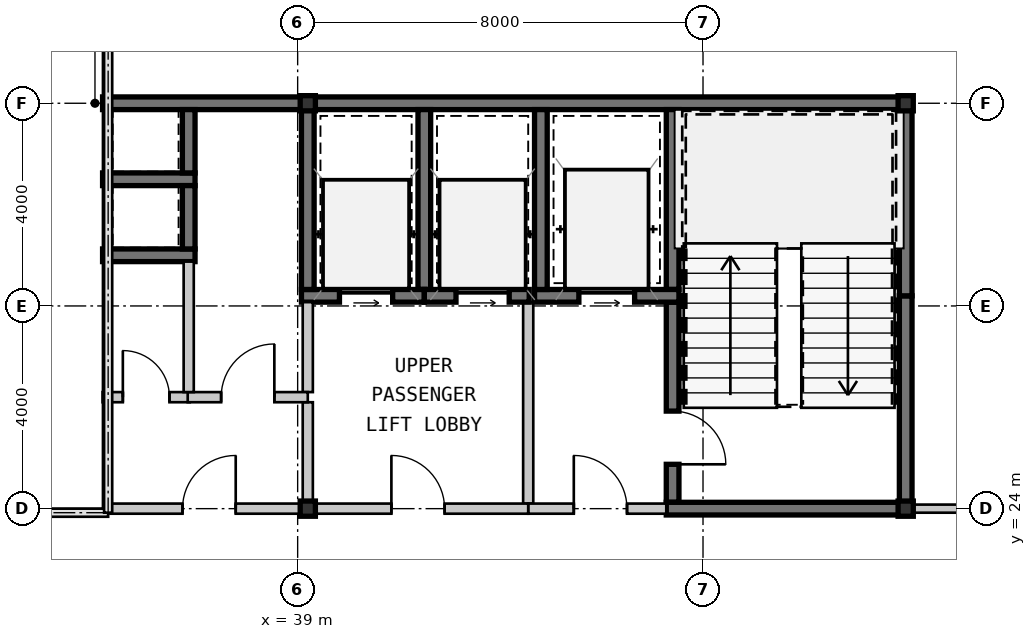
"""IFC4 building model, lengths in metres.
Left out: names, types, materials, properties, quantities, classifications, styles, units other than length and angle.
Written with IfcOpenShell. Run it as: python <this file> out.ifc"""

import sys

from ifc_helpers import new_model, si_unit, direction, frame, frame_2d, origin, origin_2d, place, context, subcontext, project, spatial, rectangle, hollow_rectangle, extrude, source, transform, mapped, element, fill, save


model = new_model("IFC4")
c1 = context("Model", 3, precision=1e-05, world=origin(), true_north=direction((0.0, 1.0)))
c2 = subcontext(c1, "Body", "Model", "MODEL_VIEW")
j1 = project(units=[si_unit("LENGTHUNIT", "METRE"), si_unit("PLANEANGLEUNIT", "RADIAN")], contexts=[c1])
p1 = place(None, origin())
s1 = spatial("IfcSite", under=j1, at=p1, CompositionType="ELEMENT")
p2 = place(p1, origin())
s2 = spatial("IfcBuilding", under=s1, at=p2, CompositionType="ELEMENT")
p3 = place(p2, frame((0.0, 0.0, 233.45)))
s3 = spatial("IfcBuildingStorey", under=s2, at=p3, CompositionType="ELEMENT", Elevation=233.45)
m1 = source(origin(), c2, "Body", "SweptSolid", [
    extrude(hollow_rectangle(XDim=0.3, YDim=0.3, WallThickness=0.012, at=origin_2d()), origin(), (0.0, 0.0, 1.0), 3.15),
])
for number, where, z_axis, x_axis in (
    (1, (39.2, 24.0, 0.0), (0.0, 0.0, 1.0), (1.0, 0.0, 0.0)),
    (2, (51.0, 24.0, 0.0), (0.0, 0.0, 1.0), (1.0, 0.0, 0.0)),
    (3, (39.2, 32.0, 0.0), (0.0, 0.0, 1.0), (1.0, 0.0, 0.0)),
    (4, (51.0, 32.0, 0.0), (0.0, 0.0, 1.0), (1.0, 0.0, 0.0)),
):
    element("IfcColumn", number, at=place(p3, frame(where, z_axis=z_axis, x_axis=x_axis)), inside=s3, PredefinedType="COLUMN", context=c2, shape_type="MappedRepresentation", body=[
        mapped(m1, transform((0.0, 0.0, 0.0), scale=1.0)),
    ])
m2 = source(origin(), c2, "Body", "SweptSolid", [
    extrude(rectangle(XDim=4.05, YDim=0.25, at=frame_2d((2.025, 0.0))), origin(), (0.0, 0.0, 1.0), 2.87),
])
p4 = place(p3, frame((35.15, 32.0, 0.0), z_axis=(0.0, 0.0, 1.0), x_axis=(1.0, 0.0, 0.0)))
e5 = element("IfcWall", 5, at=p4, inside=s3, PredefinedType="SHEAR", context=c2, shape_type="MappedRepresentation", body=[
    mapped(m2, transform((0.0, 0.0, 0.0), scale=1.0)),
])
m3 = source(origin(), c2, "Body", "SweptSolid", [
    extrude(rectangle(XDim=11.925, YDim=0.25, at=frame_2d((5.962, 0.0))), origin(), (0.0, 0.0, 1.0), 2.87),
])
p5 = place(p3, frame((39.2, 32.0, 0.0), z_axis=(0.0, 0.0, 1.0), x_axis=(1.0, 0.0, 0.0)))
e6 = element("IfcWall", 6, at=p5, inside=s3, PredefinedType="SHEAR", context=c2, shape_type="MappedRepresentation", body=[
    mapped(m3, transform((0.0, 0.0, 0.0), scale=1.0)),
])
m4 = source(origin(), c2, "Body", "SweptSolid", [
    extrude(rectangle(XDim=4.075, YDim=0.25, at=frame_2d((2.038, 0.0))), origin(), (0.0, 0.0, 1.0), 2.87),
])
p6 = place(p3, frame((51.0, 24.125, 0.0), z_axis=(0.0, 0.0, 1.0), x_axis=(0.0, 1.0, 0.0)))
e7 = element("IfcWall", 7, at=p6, inside=s3, PredefinedType="SHEAR", context=c2, shape_type="MappedRepresentation", body=[
    mapped(m4, transform((0.0, 0.0, 0.0), scale=1.0)),
])
m5 = source(origin(), c2, "Body", "SweptSolid", [
    extrude(rectangle(XDim=3.675, YDim=0.25, at=frame_2d((1.837, 0.0))), origin(), (0.0, 0.0, 1.0), 2.87),
])
p7 = place(p3, frame((51.0, 28.2, 0.0), z_axis=(0.0, 0.0, 1.0), x_axis=(0.0, 1.0, 0.0)))
e8 = element("IfcWall", 8, at=p7, inside=s3, PredefinedType="SHEAR", context=c2, shape_type="MappedRepresentation", body=[
    mapped(m5, transform((0.0, 0.0, 0.0), scale=1.0)),
])
m6 = source(origin(), c2, "Body", "SweptSolid", [
    extrude(rectangle(XDim=3.55, YDim=0.25, at=frame_2d((1.775, 0.0))), origin(), (0.0, 0.0, 1.0), 2.87),
])
p8 = place(p3, frame((46.4, 31.875, 0.0), z_axis=(0.0, 0.0, 1.0), x_axis=(0.0, -1.0, 0.0)))
e9 = element("IfcWall", 9, at=p8, inside=s3, PredefinedType="SHEAR", context=c2, shape_type="MappedRepresentation", body=[
    mapped(m6, transform((0.0, 0.0, 0.0), scale=1.0)),
])
m7 = source(origin(), c2, "Body", "SweptSolid", [
    extrude(rectangle(XDim=3.95, YDim=0.25, at=frame_2d((1.975, 0.0))), origin(), (0.0, 0.0, 1.0), 2.87),
])
p9 = place(p3, frame((46.4, 28.075, 0.0), z_axis=(0.0, 0.0, 1.0), x_axis=(0.0, -1.0, 0.0)))
e10 = element("IfcWall", 10, at=p9, inside=s3, PredefinedType="SHEAR", context=c2, shape_type="MappedRepresentation", body=[
    mapped(m7, transform((0.0, 0.0, 0.0), scale=1.0)),
])
m8 = source(origin(), c2, "Body", "SweptSolid", [
    extrude(rectangle(XDim=1.05, YDim=2.1, at=frame_2d((0.525, 1.05))), frame((0.0, 0.135, 0.0), z_axis=(0.0, -1.0, 0.0), x_axis=(1.0, 0.0, 0.0)), (0.0, 0.0, 1.0), 0.27),
])
p10 = place(p9, frame((2.15, 0.0, 0.0)))
e11 = element("IfcOpeningElement", 11, at=p10, cuts=e10, PredefinedType="OPENING", context=c2, shape_type="MappedRepresentation", body=[
    mapped(m8, transform((0.0, 0.0, 0.0), scale=1.0)),
])
m9 = source(origin(), c2, "Body", "SweptSolid", [
    extrude(rectangle(XDim=4.85, YDim=0.25, at=frame_2d((2.425, 0.0))), origin(), (0.0, 0.0, 1.0), 2.87),
])
p11 = place(p3, frame((46.275, 24.0, 0.0), z_axis=(0.0, 0.0, 1.0), x_axis=(1.0, 0.0, 0.0)))
e12 = element("IfcWall", 12, at=p11, inside=s3, PredefinedType="SHEAR", context=c2, shape_type="MappedRepresentation", body=[
    mapped(m9, transform((0.0, 0.0, 0.0), scale=1.0)),
])
m10 = source(origin(), c2, "Body", "SweptSolid", [
    extrude(rectangle(XDim=2.85, YDim=0.25, at=frame_2d((1.425, 0.0))), origin(), (0.0, 0.0, 1.0), 2.87),
])
p12 = place(p3, frame((43.675, 28.2, 0.0), z_axis=(0.0, 0.0, 1.0), x_axis=(1.0, 0.0, 0.0)))
e13 = element("IfcWall", 13, at=p12, inside=s3, PredefinedType="SHEAR", context=c2, shape_type="MappedRepresentation", body=[
    mapped(m10, transform((0.0, 0.0, 0.0), scale=1.0)),
])
m11 = source(origin(), c2, "Body", "SweptSolid", [
    extrude(rectangle(XDim=1.1, YDim=2.15, at=frame_2d((0.55, 1.075))), frame((0.0, 0.135, 0.0), z_axis=(0.0, -1.0, 0.0), x_axis=(1.0, 0.0, 0.0)), (0.0, 0.0, 1.0), 0.27),
])
p13 = place(p12, frame((0.875, 0.0, 0.0)))
e14 = element("IfcOpeningElement", 14, at=p13, cuts=e13, PredefinedType="OPENING", context=c2, shape_type="MappedRepresentation", body=[
    mapped(m11, transform((0.0, 0.0, 0.0), scale=1.0)),
])
p14 = place(p3, frame((43.8, 31.875, 0.0), z_axis=(0.0, 0.0, 1.0), x_axis=(0.0, -1.0, 0.0)))
e15 = element("IfcWall", 15, at=p14, inside=s3, PredefinedType="SHEAR", context=c2, shape_type="MappedRepresentation", body=[
    mapped(m6, transform((0.0, 0.0, 0.0), scale=1.0)),
])
m12 = source(origin(), c2, "Body", "SweptSolid", [
    extrude(rectangle(XDim=3.975, YDim=0.2, at=frame_2d((1.987, 0.0))), origin(), (0.0, 0.0, 1.0), 2.87),
])
p15 = place(p3, frame((43.55, 28.075, 0.0), z_axis=(0.0, 0.0, 1.0), x_axis=(0.0, -1.0, 0.0)))
e16 = element("IfcWall", 16, at=p15, inside=s3, PredefinedType="SOLIDWALL", context=c2, shape_type="MappedRepresentation", body=[
    mapped(m12, transform((0.0, 0.0, 0.0), scale=1.0)),
])
m13 = source(origin(), c2, "Body", "SweptSolid", [
    extrude(rectangle(XDim=2.725, YDim=0.2, at=frame_2d((1.362, 0.0))), origin(), (0.0, 0.0, 1.0), 2.337),
])
p16 = place(p3, frame((43.55, 24.0, 0.0), z_axis=(0.0, 0.0, 1.0), x_axis=(1.0, 0.0, 0.0)))
e17 = element("IfcWall", 17, at=p16, inside=s3, PredefinedType="SOLIDWALL", context=c2, shape_type="MappedRepresentation", body=[
    mapped(m13, transform((0.0, 0.0, 0.0), scale=1.0)),
])
m14 = source(origin(), c2, "Body", "SweptSolid", [
    extrude(rectangle(XDim=1.05, YDim=2.1, at=frame_2d((0.525, 1.05))), frame((0.0, 0.11, 0.0), z_axis=(0.0, -1.0, 0.0), x_axis=(1.0, 0.0, 0.0)), (0.0, 0.0, 1.0), 0.22),
])
p17 = place(p16, frame((0.9, 0.0, 0.0)))
e18 = element("IfcOpeningElement", 18, at=p17, cuts=e17, PredefinedType="OPENING", context=c2, shape_type="MappedRepresentation", body=[
    mapped(m14, transform((0.0, 0.0, 0.0), scale=1.0)),
])
m15 = source(origin(), c2, "Body", "SweptSolid", [
    extrude(rectangle(XDim=1.825, YDim=0.25, at=frame_2d((0.913, 0.0))), origin(), (0.0, 0.0, 1.0), 2.87),
])
p18 = place(p3, frame((35.15, 30.5, 0.0), z_axis=(0.0, 0.0, 1.0), x_axis=(1.0, 0.0, 0.0)))
e19 = element("IfcWall", 19, at=p18, inside=s3, PredefinedType="SHEAR", context=c2, shape_type="MappedRepresentation", body=[
    mapped(m15, transform((0.0, 0.0, 0.0), scale=1.0)),
])
m16 = source(origin(), c2, "Body", "SweptSolid", [
    extrude(rectangle(XDim=1.25, YDim=0.25, at=frame_2d((0.625, 0.0))), origin(), (0.0, 0.0, 1.0), 2.87),
])
p19 = place(p3, frame((36.85, 30.625, 0.0), z_axis=(0.0, 0.0, 1.0), x_axis=(0.0, 1.0, 0.0)))
e20 = element("IfcWall", 20, at=p19, inside=s3, PredefinedType="SHEAR", context=c2, shape_type="MappedRepresentation", body=[
    mapped(m16, transform((0.0, 0.0, 0.0), scale=1.0)),
])
p20 = place(p3, frame((35.15, 29.0, 0.0), z_axis=(0.0, 0.0, 1.0), x_axis=(1.0, 0.0, 0.0)))
e21 = element("IfcWall", 21, at=p20, inside=s3, PredefinedType="SHEAR", context=c2, shape_type="MappedRepresentation", body=[
    mapped(m15, transform((0.0, 0.0, 0.0), scale=1.0)),
])
p21 = place(p3, frame((36.85, 29.125, 0.0), z_axis=(0.0, 0.0, 1.0), x_axis=(0.0, 1.0, 0.0)))
e22 = element("IfcWall", 22, at=p21, inside=s3, PredefinedType="SHEAR", context=c2, shape_type="MappedRepresentation", body=[
    mapped(m16, transform((0.0, 0.0, 0.0), scale=1.0)),
])
p22 = place(p3, frame((41.5, 28.325, 0.0), z_axis=(0.0, 0.0, 1.0), x_axis=(0.0, 1.0, 0.0)))
e23 = element("IfcWall", 23, at=p22, inside=s3, PredefinedType="SHEAR", context=c2, shape_type="MappedRepresentation", body=[
    mapped(m6, transform((0.0, 0.0, 0.0), scale=1.0)),
])
m17 = source(origin(), c2, "Body", "SweptSolid", [
    extrude(rectangle(XDim=2.425, YDim=0.25, at=frame_2d((1.212, 0.0))), origin(), (0.0, 0.0, 1.0), 2.87),
])
p23 = place(p3, frame((39.075, 28.2, 0.0), z_axis=(0.0, 0.0, 1.0), x_axis=(1.0, 0.0, 0.0)))
e24 = element("IfcWall", 24, at=p23, inside=s3, PredefinedType="SHEAR", context=c2, shape_type="MappedRepresentation", body=[
    mapped(m17, transform((0.0, 0.0, 0.0), scale=1.0)),
])
m18 = source(origin(), c2, "Body", "SweptSolid", [
    extrude(rectangle(XDim=1.05, YDim=2.15, at=frame_2d((0.525, 1.075))), frame((0.0, 0.135, 0.0), z_axis=(0.0, -1.0, 0.0), x_axis=(1.0, 0.0, 0.0)), (0.0, 0.0, 1.0), 0.27),
])
p24 = place(p23, frame((0.75, 0.0, 0.0)))
e25 = element("IfcOpeningElement", 25, at=p24, cuts=e24, PredefinedType="OPENING", context=c2, shape_type="MappedRepresentation", body=[
    mapped(m18, transform((0.0, 0.0, 0.0), scale=1.0)),
])
p25 = place(p3, frame((39.2, 31.875, 0.0), z_axis=(0.0, 0.0, 1.0), x_axis=(0.0, -1.0, 0.0)))
e26 = element("IfcWall", 26, at=p25, inside=s3, PredefinedType="SHEAR", context=c2, shape_type="MappedRepresentation", body=[
    mapped(m6, transform((0.0, 0.0, 0.0), scale=1.0)),
])
m19 = source(origin(), c2, "Body", "SweptSolid", [
    extrude(rectangle(XDim=2.07, YDim=0.25, at=frame_2d((1.035, 0.0))), origin(), (0.0, 0.0, 1.0), 2.87),
])
p26 = place(p3, frame((41.5, 28.2, 0.0), z_axis=(0.0, 0.0, 1.0), x_axis=(1.0, 0.0, 0.0)))
e27 = element("IfcWall", 27, at=p26, inside=s3, PredefinedType="SHEAR", context=c2, shape_type="MappedRepresentation", body=[
    mapped(m19, transform((0.0, 0.0, 0.0), scale=1.0)),
])
p27 = place(p26, frame((0.625, 0.0, 0.0)))
e28 = element("IfcOpeningElement", 28, at=p27, cuts=e27, PredefinedType="OPENING", context=c2, shape_type="MappedRepresentation", body=[
    mapped(m18, transform((0.0, 0.0, 0.0), scale=1.0)),
])
m20 = source(origin(), c2, "Body", "SweptSolid", [
    extrude(rectangle(XDim=2.0, YDim=0.2, at=frame_2d((1.0, 0.0))), origin(), (0.0, 0.0, 1.0), 2.41),
])
p28 = place(p3, frame((39.2, 24.1, 0.0), z_axis=(0.0, 0.0, 1.0), x_axis=(0.0, 1.0, 0.0)))
e29 = element("IfcWall", 29, at=p28, inside=s3, PredefinedType="SOLIDWALL", context=c2, shape_type="MappedRepresentation", body=[
    mapped(m20, transform((0.0, 0.0, 0.0), scale=1.0)),
])
m21 = source(origin(), c2, "Body", "SweptSolid", [
    extrude(rectangle(XDim=1.775, YDim=0.2, at=frame_2d((0.887, 0.0))), origin(), (0.0, 0.0, 1.0), 2.41),
])
p29 = place(p3, frame((39.2, 26.3, 0.0), z_axis=(0.0, 0.0, 1.0), x_axis=(0.0, 1.0, 0.0)))
e30 = element("IfcWall", 30, at=p29, inside=s3, PredefinedType="SOLIDWALL", context=c2, shape_type="MappedRepresentation", body=[
    mapped(m21, transform((0.0, 0.0, 0.0), scale=1.0)),
])
m22 = source(origin(), c2, "Body", "SweptSolid", [
    extrude(rectangle(XDim=4.35, YDim=0.2, at=frame_2d((2.175, 0.0))), origin(), (0.0, 0.0, 1.0), 2.337),
])
p30 = place(p3, frame((43.55, 24.0, 0.0), z_axis=(0.0, 0.0, 1.0), x_axis=(-1.0, 0.0, 0.0)))
e31 = element("IfcWall", 31, at=p30, inside=s3, PredefinedType="SOLIDWALL", context=c2, shape_type="MappedRepresentation", body=[
    mapped(m22, transform((0.0, 0.0, 0.0), scale=1.0)),
])
p31 = place(p30, frame((1.65, 0.0, 0.0)))
e32 = element("IfcOpeningElement", 32, at=p31, cuts=e31, PredefinedType="OPENING", context=c2, shape_type="MappedRepresentation", body=[
    mapped(m14, transform((0.0, 0.0, 0.0), scale=1.0)),
])
m23 = source(origin(), c2, "Body", "SweptSolid", [
    extrude(rectangle(XDim=1.72, YDim=0.2, at=frame_2d((0.86, 0.0))), origin(), (0.0, 0.0, 1.0), 2.87),
])
p32 = place(p3, frame((35.15, 26.2, 0.0), z_axis=(0.0, 0.0, 1.0), x_axis=(1.0, 0.0, 0.0)))
e33 = element("IfcWall", 33, at=p32, inside=s3, PredefinedType="SOLIDWALL", context=c2, shape_type="MappedRepresentation", body=[
    mapped(m23, transform((0.0, 0.0, 0.0), scale=1.0)),
])
m24 = source(origin(), c2, "Body", "SweptSolid", [
    extrude(rectangle(XDim=0.92, YDim=2.1, at=frame_2d((0.46, 1.05))), frame((0.0, 0.11, 0.0), z_axis=(0.0, -1.0, 0.0), x_axis=(1.0, 0.0, 0.0)), (0.0, 0.0, 1.0), 0.22),
])
p33 = place(p32, frame((0.4, 0.0, 0.0)))
e34 = element("IfcOpeningElement", 34, at=p33, cuts=e33, PredefinedType="OPENING", context=c2, shape_type="MappedRepresentation", body=[
    mapped(m24, transform((0.0, 0.0, 0.0), scale=1.0)),
])
m25 = source(origin(), c2, "Body", "SweptSolid", [
    extrude(rectangle(XDim=2.37, YDim=0.2, at=frame_2d((1.185, 0.0))), origin(), (0.0, 0.0, 1.0), 2.87),
])
p34 = place(p3, frame((36.83, 26.2, 0.0), z_axis=(0.0, 0.0, 1.0), x_axis=(1.0, 0.0, 0.0)))
e35 = element("IfcWall", 35, at=p34, inside=s3, PredefinedType="SOLIDWALL", context=c2, shape_type="MappedRepresentation", body=[
    mapped(m25, transform((0.0, 0.0, 0.0), scale=1.0)),
])
p35 = place(p34, frame((0.66, 0.0, 0.0)))
e36 = element("IfcOpeningElement", 36, at=p35, cuts=e35, PredefinedType="OPENING", context=c2, shape_type="MappedRepresentation", body=[
    mapped(m14, transform((0.0, 0.0, 0.0), scale=1.0)),
])
m26 = source(origin(), c2, "Body", "SweptSolid", [
    extrude(rectangle(XDim=3.895, YDim=0.2, at=frame_2d((1.947, 0.0))), origin(), (0.0, 0.0, 1.0), 2.17),
])
p36 = place(p3, frame((39.2, 24.0, 0.0), z_axis=(0.0, 0.0, 1.0), x_axis=(-1.0, 0.0, 0.0)))
e37 = element("IfcWall", 37, at=p36, inside=s3, PredefinedType="SOLIDWALL", context=c2, shape_type="MappedRepresentation", body=[
    mapped(m26, transform((0.0, 0.0, 0.0), scale=1.0)),
])
p37 = place(p36, frame((1.422, 0.0, 0.0)))
e38 = element("IfcOpeningElement", 38, at=p37, cuts=e37, PredefinedType="OPENING", context=c2, shape_type="MappedRepresentation", body=[
    mapped(m14, transform((0.0, 0.0, 0.0), scale=1.0)),
])
m27 = source(origin(), c2, "Body", "SweptSolid", [
    extrude(rectangle(XDim=2.575, YDim=0.2, at=frame_2d((1.288, 0.0))), origin(), (0.0, 0.0, 1.0), 2.87),
])
p38 = place(p3, frame((36.85, 28.875, 0.0), z_axis=(0.0, 0.0, 1.0), x_axis=(0.0, -1.0, 0.0)))
e39 = element("IfcWall", 39, at=p38, inside=s3, PredefinedType="SOLIDWALL", context=c2, shape_type="MappedRepresentation", body=[
    mapped(m27, transform((0.0, 0.0, 0.0), scale=1.0)),
])
m28 = source(origin(), c2, "Body", "SweptSolid", [
    extrude(rectangle(XDim=6.378, YDim=0.16, at=frame_2d((3.189, 0.0))), origin(), (0.0, 0.0, 1.0), 2.87),
])
p39 = place(p3, frame((51.125, 24.0, 0.0), z_axis=(0.0, 0.0, 1.0), x_axis=(1.0, 0.0, 0.0)))
e40 = element("IfcWall", 40, at=p39, inside=s3, PredefinedType="PARTITIONING", context=c2, shape_type="MappedRepresentation", body=[
    mapped(m28, transform((0.0, 0.0, 0.0), scale=1.0)),
])
m29 = source(origin(), c2, "Body", "SweptSolid", [
    extrude(rectangle(XDim=0.92, YDim=2.1, at=frame_2d((0.46, 1.05))), frame((0.0, 0.09, 0.0), z_axis=(0.0, -1.0, 0.0), x_axis=(1.0, 0.0, 0.0)), (0.0, 0.0, 1.0), 0.18),
])
p40 = place(p39, frame((2.677, 0.0, 0.0)))
e41 = element("IfcOpeningElement", 41, at=p40, cuts=e40, PredefinedType="OPENING", context=c2, shape_type="MappedRepresentation", body=[
    mapped(m29, transform((0.0, 0.0, 0.0), scale=1.0)),
])
m30 = source(origin(), c2, "Body", "SweptSolid", [
    extrude(rectangle(XDim=1.05, YDim=2.1, at=frame_2d((0.525, 1.05))), frame((0.0, 0.025, 0.0), z_axis=(0.0, -1.0, 0.0), x_axis=(1.0, 0.0, 0.0)), (0.0, 0.0, 1.0), 0.05),
])
p41 = place(p10, origin())
e42 = element("IfcDoor", 42, at=p41, inside=s3, OperationType="SINGLE_SWING_RIGHT", PredefinedType="DOOR", context=c2, shape_type="MappedRepresentation", body=[
    mapped(m30, transform((0.0, 0.0, 0.0), scale=1.0)),
])
fill(e11, e42)
m31 = source(origin(), c2, "Body", "SweptSolid", [
    extrude(rectangle(XDim=1.1, YDim=2.15, at=frame_2d((0.55, 1.075))), frame((0.0, 0.025, 0.0), z_axis=(0.0, -1.0, 0.0), x_axis=(1.0, 0.0, 0.0)), (0.0, 0.0, 1.0), 0.05),
])
p42 = place(p13, origin())
e43 = element("IfcDoor", 43, at=p42, inside=s3, OperationType="SLIDING_TO_LEFT", PredefinedType="DOOR", context=c2, shape_type="MappedRepresentation", body=[
    mapped(m31, transform((0.0, 0.0, 0.0), scale=1.0)),
])
fill(e14, e43)
p43 = place(p17, origin())
e44 = element("IfcDoor", 44, at=p43, inside=s3, OperationType="SINGLE_SWING_LEFT", PredefinedType="DOOR", context=c2, shape_type="MappedRepresentation", body=[
    mapped(m30, transform((0.0, 0.0, 0.0), scale=1.0)),
])
fill(e18, e44)
m32 = source(origin(), c2, "Body", "SweptSolid", [
    extrude(rectangle(XDim=1.05, YDim=2.15, at=frame_2d((0.525, 1.075))), frame((0.0, 0.025, 0.0), z_axis=(0.0, -1.0, 0.0), x_axis=(1.0, 0.0, 0.0)), (0.0, 0.0, 1.0), 0.05),
])
p44 = place(p24, origin())
e45 = element("IfcDoor", 45, at=p44, inside=s3, OperationType="SLIDING_TO_LEFT", PredefinedType="DOOR", context=c2, shape_type="MappedRepresentation", body=[
    mapped(m32, transform((0.0, 0.0, 0.0), scale=1.0)),
])
fill(e25, e45)
p45 = place(p27, origin())
e46 = element("IfcDoor", 46, at=p45, inside=s3, OperationType="SLIDING_TO_LEFT", PredefinedType="DOOR", context=c2, shape_type="MappedRepresentation", body=[
    mapped(m32, transform((0.0, 0.0, 0.0), scale=1.0)),
])
fill(e28, e46)
p46 = place(p31, frame((1.05, 0.0, 0.0), z_axis=(0.0, 0.0, 1.0), x_axis=(-1.0, 0.0, 0.0)))
e47 = element("IfcDoor", 47, at=p46, inside=s3, OperationType="SINGLE_SWING_LEFT", PredefinedType="DOOR", context=c2, shape_type="MappedRepresentation", body=[
    mapped(m30, transform((0.0, 0.0, 0.0), scale=1.0)),
])
fill(e32, e47)
m33 = source(origin(), c2, "Body", "SweptSolid", [
    extrude(rectangle(XDim=0.92, YDim=2.1, at=frame_2d((0.46, 1.05))), frame((0.0, 0.025, 0.0), z_axis=(0.0, -1.0, 0.0), x_axis=(1.0, 0.0, 0.0)), (0.0, 0.0, 1.0), 0.05),
])
p47 = place(p33, origin())
e48 = element("IfcDoor", 48, at=p47, inside=s3, OperationType="SINGLE_SWING_LEFT", PredefinedType="DOOR", context=c2, shape_type="MappedRepresentation", body=[
    mapped(m33, transform((0.0, 0.0, 0.0), scale=1.0)),
])
fill(e34, e48)
p48 = place(p35, origin())
e49 = element("IfcDoor", 49, at=p48, inside=s3, OperationType="SINGLE_SWING_RIGHT", PredefinedType="DOOR", context=c2, shape_type="MappedRepresentation", body=[
    mapped(m30, transform((0.0, 0.0, 0.0), scale=1.0)),
])
fill(e36, e49)
p49 = place(p37, frame((1.05, 0.0, 0.0), z_axis=(0.0, 0.0, 1.0), x_axis=(-1.0, 0.0, 0.0)))
e50 = element("IfcDoor", 50, at=p49, inside=s3, OperationType="SINGLE_SWING_RIGHT", PredefinedType="DOOR", context=c2, shape_type="MappedRepresentation", body=[
    mapped(m30, transform((0.0, 0.0, 0.0), scale=1.0)),
])
fill(e38, e50)
save(model, sys.argv[1])
